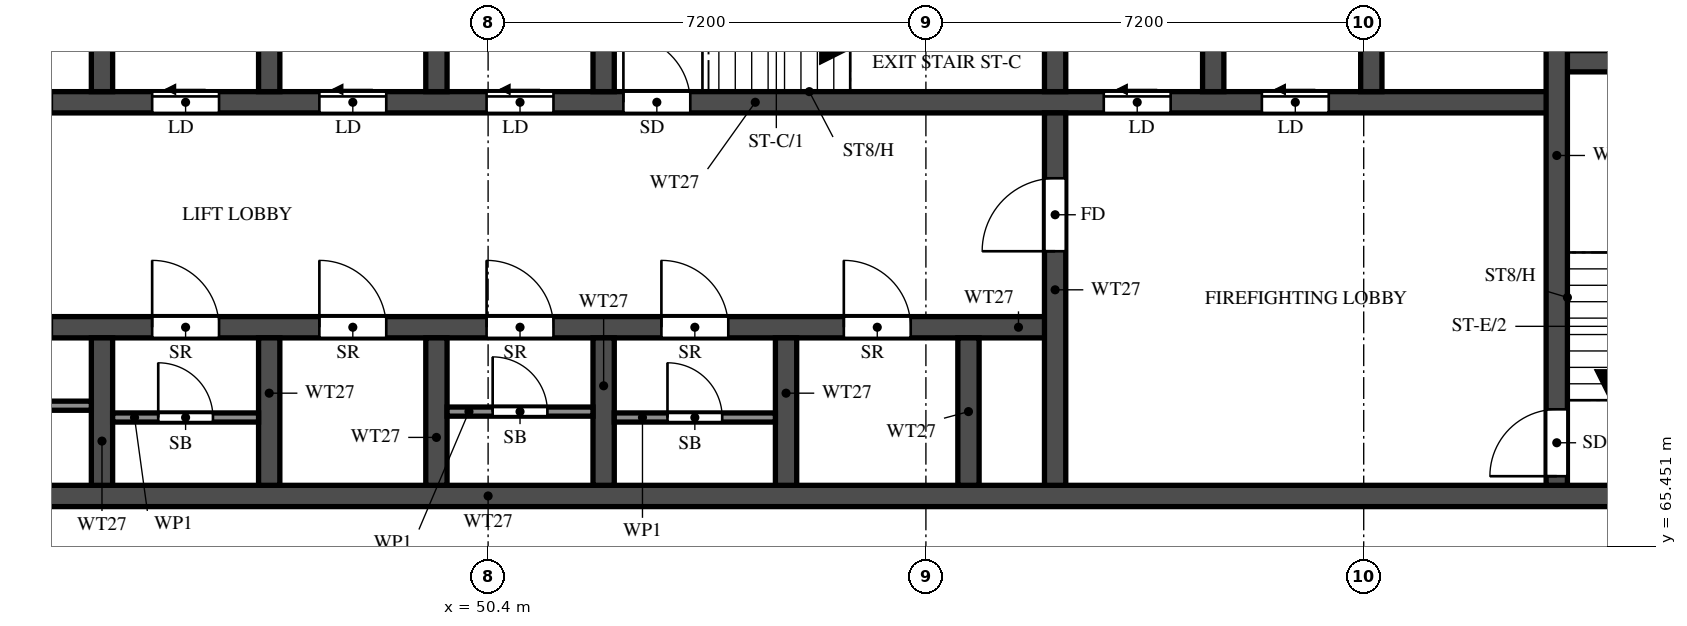
"""IFC4 building model, lengths in metres.
Left out: names, types, materials, properties, quantities, classifications, styles, units other than length and angle.
Written with IfcOpenShell. Run it as: python <this file> out.ifc"""

import sys

from ifc_helpers import new_model, si_unit, direction, frame, frame_2d, origin, place, context, subcontext, project, spatial, rectangle, extrude, element, fill, save


model = new_model("IFC4")
c1 = context("Model", 3, precision=1e-05, world=origin(), true_north=direction((0.0, 1.0)))
c2 = subcontext(c1, "Body", "Model", "MODEL_VIEW")
j1 = project(units=[si_unit("LENGTHUNIT", "METRE"), si_unit("PLANEANGLEUNIT", "RADIAN")], contexts=[c1])
p1 = place(None, origin())
s1 = spatial("IfcSite", under=j1, at=p1, CompositionType="ELEMENT")
p2 = place(p1, origin())
s2 = spatial("IfcBuilding", under=s1, at=p2, CompositionType="ELEMENT")
p3 = place(p2, frame((0.0, 0.0, 171.0)))
s3 = spatial("IfcBuildingStorey", under=s2, at=p3, CompositionType="ELEMENT", Elevation=171.0)
p4 = place(p3, frame((29.7, 66.275, 0.0), z_axis=(0.0, 0.0, 1.0), x_axis=(1.0, 0.0, 0.0)))
e1 = element("IfcWall", 1, at=p4, inside=s3, PredefinedType="SHEAR", context=c2, shape_type="SweptSolid", body=[
    extrude(rectangle(XDim=41.4, YDim=0.35, at=frame_2d((20.7, 0.0))), origin(), (0.0, 0.0, 1.0), 3.2),
])
p5 = place(p4, frame((0.925, 0.0, 0.0)))
e2 = element("IfcOpeningElement", 2, at=p5, cuts=e1, PredefinedType="OPENING", context=c2, shape_type="SweptSolid", body=[
    extrude(rectangle(XDim=1.1, YDim=2.1, at=frame_2d((0.55, 1.05))), frame((0.0, 0.185, 0.0), z_axis=(0.0, -1.0, 0.0), x_axis=(1.0, 0.0, 0.0)), (0.0, 0.0, 1.0), 0.37),
])
p6 = place(p4, frame((3.712, 0.0, 0.0)))
e3 = element("IfcOpeningElement", 3, at=p6, cuts=e1, PredefinedType="OPENING", context=c2, shape_type="SweptSolid", body=[
    extrude(rectangle(XDim=1.8, YDim=2.1, at=frame_2d((0.9, 1.05))), frame((0.0, 0.185, 0.0), z_axis=(0.0, -1.0, 0.0), x_axis=(1.0, 0.0, 0.0)), (0.0, 0.0, 1.0), 0.37),
])
p7 = place(p3, frame((35.625, 69.05, 0.0), z_axis=(0.0, 0.0, 1.0), x_axis=(1.0, 0.0, 0.0)))
e4 = element("IfcWall", 4, at=p7, inside=s3, PredefinedType="SHEAR", context=c2, shape_type="SweptSolid", body=[
    extrude(rectangle(XDim=24.1, YDim=0.35, at=frame_2d((12.05, 0.0))), origin(), (0.0, 0.0, 1.0), 3.2),
])
p8 = place(p7, frame((1.0, 0.0, 0.0)))
e5 = element("IfcOpeningElement", 5, at=p8, cuts=e4, PredefinedType="OPENING", context=c2, shape_type="SweptSolid", body=[
    extrude(rectangle(XDim=1.1, YDim=2.1, at=frame_2d((0.55, 1.05))), frame((0.0, 0.185, 0.0), z_axis=(0.0, -1.0, 0.0), x_axis=(1.0, 0.0, 0.0)), (0.0, 0.0, 1.0), 0.37),
])
p9 = place(p7, frame((3.75, 0.0, 0.0)))
e6 = element("IfcOpeningElement", 6, at=p9, cuts=e4, PredefinedType="OPENING", context=c2, shape_type="SweptSolid", body=[
    extrude(rectangle(XDim=1.1, YDim=2.1, at=frame_2d((0.55, 1.05))), frame((0.0, 0.185, 0.0), z_axis=(0.0, -1.0, 0.0), x_axis=(1.0, 0.0, 0.0)), (0.0, 0.0, 1.0), 0.37),
])
p10 = place(p7, frame((6.5, 0.0, 0.0)))
e7 = element("IfcOpeningElement", 7, at=p10, cuts=e4, PredefinedType="OPENING", context=c2, shape_type="SweptSolid", body=[
    extrude(rectangle(XDim=1.1, YDim=2.1, at=frame_2d((0.55, 1.05))), frame((0.0, 0.185, 0.0), z_axis=(0.0, -1.0, 0.0), x_axis=(1.0, 0.0, 0.0)), (0.0, 0.0, 1.0), 0.37),
])
p11 = place(p7, frame((9.25, 0.0, 0.0)))
e8 = element("IfcOpeningElement", 8, at=p11, cuts=e4, PredefinedType="OPENING", context=c2, shape_type="SweptSolid", body=[
    extrude(rectangle(XDim=1.1, YDim=2.1, at=frame_2d((0.55, 1.05))), frame((0.0, 0.185, 0.0), z_axis=(0.0, -1.0, 0.0), x_axis=(1.0, 0.0, 0.0)), (0.0, 0.0, 1.0), 0.37),
])
p12 = place(p7, frame((12.0, 0.0, 0.0)))
e9 = element("IfcOpeningElement", 9, at=p12, cuts=e4, PredefinedType="OPENING", context=c2, shape_type="SweptSolid", body=[
    extrude(rectangle(XDim=1.1, YDim=2.1, at=frame_2d((0.55, 1.05))), frame((0.0, 0.185, 0.0), z_axis=(0.0, -1.0, 0.0), x_axis=(1.0, 0.0, 0.0)), (0.0, 0.0, 1.0), 0.37),
])
p13 = place(p7, frame((14.75, 0.0, 0.0)))
e10 = element("IfcOpeningElement", 10, at=p13, cuts=e4, PredefinedType="OPENING", context=c2, shape_type="SweptSolid", body=[
    extrude(rectangle(XDim=1.1, YDim=2.1, at=frame_2d((0.55, 1.05))), frame((0.0, 0.185, 0.0), z_axis=(0.0, -1.0, 0.0), x_axis=(1.0, 0.0, 0.0)), (0.0, 0.0, 1.0), 0.37),
])
p14 = place(p7, frame((17.625, 0.0, 0.0)))
e11 = element("IfcOpeningElement", 11, at=p14, cuts=e4, PredefinedType="OPENING", context=c2, shape_type="SweptSolid", body=[
    extrude(rectangle(XDim=1.1, YDim=2.1, at=frame_2d((0.55, 1.05))), frame((0.0, 0.185, 0.0), z_axis=(0.0, -1.0, 0.0), x_axis=(1.0, 0.0, 0.0)), (0.0, 0.0, 1.0), 0.37),
])
p15 = place(p7, frame((20.625, 0.0, 0.0)))
e12 = element("IfcOpeningElement", 12, at=p15, cuts=e4, PredefinedType="OPENING", context=c2, shape_type="SweptSolid", body=[
    extrude(rectangle(XDim=1.1, YDim=2.1, at=frame_2d((0.55, 1.05))), frame((0.0, 0.185, 0.0), z_axis=(0.0, -1.0, 0.0), x_axis=(1.0, 0.0, 0.0)), (0.0, 0.0, 1.0), 0.37),
])
p16 = place(p3, frame((32.825, 72.75, 0.0), z_axis=(0.0, 0.0, 1.0), x_axis=(1.0, 0.0, 0.0)))
e13 = element("IfcWall", 13, at=p16, inside=s3, PredefinedType="SHEAR", context=c2, shape_type="SweptSolid", body=[
    extrude(rectangle(XDim=35.15, YDim=0.35, at=frame_2d((17.575, 0.0))), origin(), (0.0, 0.0, 1.0), 3.2),
])
p17 = place(p16, frame((19.8, 0.0, 0.0)))
e14 = element("IfcOpeningElement", 14, at=p17, cuts=e13, PredefinedType="OPENING", context=c2, shape_type="SweptSolid", body=[
    extrude(rectangle(XDim=1.1, YDim=2.1, at=frame_2d((0.55, 1.05))), frame((0.0, 0.185, 0.0), z_axis=(0.0, -1.0, 0.0), x_axis=(1.0, 0.0, 0.0)), (0.0, 0.0, 1.0), 0.37),
])
p18 = place(p16, frame((27.7, 0.0, 0.0)))
e15 = element("IfcOpeningElement", 15, at=p18, cuts=e13, PredefinedType="OPENING", context=c2, shape_type="SweptSolid", body=[
    extrude(rectangle(XDim=1.1, YDim=2.1, at=frame_2d((0.55, 1.05))), frame((0.0, 0.185, 0.0), z_axis=(0.0, -1.0, 0.0), x_axis=(1.0, 0.0, 0.0)), (0.0, 0.0, 1.0), 0.37),
])
p19 = place(p16, frame((30.3, 0.0, 0.0)))
e16 = element("IfcOpeningElement", 16, at=p19, cuts=e13, PredefinedType="OPENING", context=c2, shape_type="SweptSolid", body=[
    extrude(rectangle(XDim=1.1, YDim=2.1, at=frame_2d((0.55, 1.05))), frame((0.0, 0.185, 0.0), z_axis=(0.0, -1.0, 0.0), x_axis=(1.0, 0.0, 0.0)), (0.0, 0.0, 1.0), 0.37),
])
p20 = place(p16, frame((3.8, 0.0, 0.0)))
e17 = element("IfcOpeningElement", 17, at=p20, cuts=e13, PredefinedType="OPENING", context=c2, shape_type="SweptSolid", body=[
    extrude(rectangle(XDim=1.1, YDim=2.1, at=frame_2d((0.55, 1.05))), frame((0.0, 0.185, 0.0), z_axis=(0.0, -1.0, 0.0), x_axis=(1.0, 0.0, 0.0)), (0.0, 0.0, 1.0), 0.37),
])
p21 = place(p16, frame((6.55, 0.0, 0.0)))
e18 = element("IfcOpeningElement", 18, at=p21, cuts=e13, PredefinedType="OPENING", context=c2, shape_type="SweptSolid", body=[
    extrude(rectangle(XDim=1.1, YDim=2.1, at=frame_2d((0.55, 1.05))), frame((0.0, 0.185, 0.0), z_axis=(0.0, -1.0, 0.0), x_axis=(1.0, 0.0, 0.0)), (0.0, 0.0, 1.0), 0.37),
])
p22 = place(p16, frame((9.3, 0.0, 0.0)))
e19 = element("IfcOpeningElement", 19, at=p22, cuts=e13, PredefinedType="OPENING", context=c2, shape_type="SweptSolid", body=[
    extrude(rectangle(XDim=1.1, YDim=2.1, at=frame_2d((0.55, 1.05))), frame((0.0, 0.185, 0.0), z_axis=(0.0, -1.0, 0.0), x_axis=(1.0, 0.0, 0.0)), (0.0, 0.0, 1.0), 0.37),
])
p23 = place(p16, frame((12.05, 0.0, 0.0)))
e20 = element("IfcOpeningElement", 20, at=p23, cuts=e13, PredefinedType="OPENING", context=c2, shape_type="SweptSolid", body=[
    extrude(rectangle(XDim=1.1, YDim=2.1, at=frame_2d((0.55, 1.05))), frame((0.0, 0.185, 0.0), z_axis=(0.0, -1.0, 0.0), x_axis=(1.0, 0.0, 0.0)), (0.0, 0.0, 1.0), 0.37),
])
p24 = place(p16, frame((14.8, 0.0, 0.0)))
e21 = element("IfcOpeningElement", 21, at=p24, cuts=e13, PredefinedType="OPENING", context=c2, shape_type="SweptSolid", body=[
    extrude(rectangle(XDim=1.1, YDim=2.1, at=frame_2d((0.55, 1.05))), frame((0.0, 0.185, 0.0), z_axis=(0.0, -1.0, 0.0), x_axis=(1.0, 0.0, 0.0)), (0.0, 0.0, 1.0), 0.37),
])
p25 = place(p16, frame((17.55, 0.0, 0.0)))
e22 = element("IfcOpeningElement", 22, at=p25, cuts=e13, PredefinedType="OPENING", context=c2, shape_type="SweptSolid", body=[
    extrude(rectangle(XDim=1.1, YDim=2.1, at=frame_2d((0.55, 1.05))), frame((0.0, 0.185, 0.0), z_axis=(0.0, -1.0, 0.0), x_axis=(1.0, 0.0, 0.0)), (0.0, 0.0, 1.0), 0.37),
])
p26 = place(p16, frame((0.938, 0.0, 0.0)))
e23 = element("IfcOpeningElement", 23, at=p26, cuts=e13, PredefinedType="OPENING", context=c2, shape_type="SweptSolid", body=[
    extrude(rectangle(XDim=1.1, YDim=2.1, at=frame_2d((0.55, 1.05))), frame((0.0, 0.185, 0.0), z_axis=(0.0, -1.0, 0.0), x_axis=(1.0, 0.0, 0.0)), (0.0, 0.0, 1.0), 0.37),
])
p27 = place(p3, frame((67.975, 73.425, 0.0), z_axis=(0.0, 0.0, 1.0), x_axis=(1.0, 0.0, 0.0)))
e24 = element("IfcWall", 24, at=p27, inside=s3, PredefinedType="SHEAR", context=c2, shape_type="SweptSolid", body=[
    extrude(rectangle(XDim=3.125, YDim=0.35, at=frame_2d((1.562, 0.0))), origin(), (0.0, 0.0, 1.0), 3.2),
])
p28 = place(p3, frame((67.975, 66.45, 0.0), z_axis=(0.0, 0.0, 1.0), x_axis=(0.0, 1.0, 0.0)))
e25 = element("IfcWall", 25, at=p28, inside=s3, PredefinedType="SHEAR", context=c2, shape_type="SweptSolid", body=[
    extrude(rectangle(XDim=10.85, YDim=0.35, at=frame_2d((5.425, 0.0))), origin(), (0.0, 0.0, 1.0), 3.2),
])
p29 = place(p28, frame((0.15, 0.0, 0.0)))
e26 = element("IfcOpeningElement", 26, at=p29, cuts=e25, PredefinedType="OPENING", context=c2, shape_type="SweptSolid", body=[
    extrude(rectangle(XDim=1.1, YDim=2.1, at=frame_2d((0.55, 1.05))), frame((0.0, 0.185, 0.0), z_axis=(0.0, -1.0, 0.0), x_axis=(1.0, 0.0, 0.0)), (0.0, 0.0, 1.0), 0.37),
])
p30 = place(p3, frame((59.725, 66.45, 0.0), z_axis=(0.0, 0.0, 1.0), x_axis=(0.0, 1.0, 0.0)))
e27 = element("IfcWall", 27, at=p30, inside=s3, PredefinedType="SHEAR", context=c2, shape_type="SweptSolid", body=[
    extrude(rectangle(XDim=6.125, YDim=0.35, at=frame_2d((3.062, 0.0))), origin(), (0.0, 0.0, 1.0), 3.2),
])
p31 = place(p30, frame((3.85, 0.0, 0.0)))
e28 = element("IfcOpeningElement", 28, at=p31, cuts=e27, PredefinedType="OPENING", context=c2, shape_type="SweptSolid", body=[
    extrude(rectangle(XDim=1.2, YDim=2.1, at=frame_2d((0.6, 1.05))), frame((0.0, 0.185, 0.0), z_axis=(0.0, -1.0, 0.0), x_axis=(1.0, 0.0, 0.0)), (0.0, 0.0, 1.0), 0.37),
])
p32 = place(p3, frame((59.725, 72.925, 0.0), z_axis=(0.0, 0.0, 1.0), x_axis=(0.0, 1.0, 0.0)))
e29 = element("IfcWall", 29, at=p32, inside=s3, PredefinedType="SHEAR", context=c2, shape_type="SweptSolid", body=[
    extrude(rectangle(XDim=2.95, YDim=0.35, at=frame_2d((1.475, 0.0))), origin(), (0.0, 0.0, 1.0), 3.2),
])
for number, where, z_axis, x_axis in (
    (30, (44.05, 66.45, 0.0), (0.0, 0.0, 1.0), (0.0, 1.0, 0.0)),
    (31, (46.8, 66.45, 0.0), (0.0, 0.0, 1.0), (0.0, 1.0, 0.0)),
    (32, (49.55, 66.45, 0.0), (0.0, 0.0, 1.0), (0.0, 1.0, 0.0)),
    (33, (52.3, 66.45, 0.0), (0.0, 0.0, 1.0), (0.0, 1.0, 0.0)),
    (34, (55.3, 66.45, 0.0), (0.0, 0.0, 1.0), (0.0, 1.0, 0.0)),
    (35, (58.3, 66.45, 0.0), (0.0, 0.0, 1.0), (0.0, 1.0, 0.0)),
):
    element("IfcWall", number, at=place(p3, frame(where, z_axis=z_axis, x_axis=x_axis)), inside=s3, PredefinedType="SHEAR", context=c2, shape_type="SweptSolid", body=[
        extrude(rectangle(XDim=2.425, YDim=0.35, at=frame_2d((1.212, 0.0))), origin(), (0.0, 0.0, 1.0), 3.2),
    ])
for number, where, z_axis, x_axis in (
    (36, (44.05, 72.925, 0.0), (0.0, 0.0, 1.0), (0.0, 1.0, 0.0)),
    (37, (46.8, 72.925, 0.0), (0.0, 0.0, 1.0), (0.0, 1.0, 0.0)),
    (38, (49.55, 72.925, 0.0), (0.0, 0.0, 1.0), (0.0, 1.0, 0.0)),
    (39, (52.3, 72.925, 0.0), (0.0, 0.0, 1.0), (0.0, 1.0, 0.0)),
    (40, (62.325, 72.925, 0.0), (0.0, 0.0, 1.0), (0.0, 1.0, 0.0)),
    (41, (64.925, 72.925, 0.0), (0.0, 0.0, 1.0), (0.0, 1.0, 0.0)),
):
    element("IfcWall", number, at=place(p3, frame(where, z_axis=z_axis, x_axis=x_axis)), inside=s3, PredefinedType="SHEAR", context=c2, shape_type="SweptSolid", body=[
        extrude(rectangle(XDim=2.95, YDim=0.35, at=frame_2d((1.475, 0.0))), origin(), (0.0, 0.0, 1.0), 3.2),
    ])
p33 = place(p3, frame((41.475, 67.76, 0.0), z_axis=(0.0, 0.0, 1.0), x_axis=(1.0, 0.0, 0.0)))
e42 = element("IfcWall", 42, at=p33, inside=s3, PredefinedType="PARTITIONING", context=c2, shape_type="SweptSolid", body=[
    extrude(rectangle(XDim=2.4, YDim=0.15, at=frame_2d((1.2, 0.0))), origin(), (0.0, 0.0, 1.0), 3.2),
])
p34 = place(p33, frame((0.75, 0.0, 0.0)))
e43 = element("IfcOpeningElement", 43, at=p34, cuts=e42, PredefinedType="OPENING", context=c2, shape_type="SweptSolid", body=[
    extrude(rectangle(XDim=0.9, YDim=2.1, at=frame_2d((0.45, 1.05))), frame((0.0, 0.085, 0.0), z_axis=(0.0, -1.0, 0.0), x_axis=(1.0, 0.0, 0.0)), (0.0, 0.0, 1.0), 0.17),
])
p35 = place(p3, frame((44.225, 67.565, 0.0), z_axis=(0.0, 0.0, 1.0), x_axis=(1.0, 0.0, 0.0)))
e44 = element("IfcWall", 44, at=p35, inside=s3, PredefinedType="PARTITIONING", context=c2, shape_type="SweptSolid", body=[
    extrude(rectangle(XDim=2.4, YDim=0.15, at=frame_2d((1.2, 0.0))), origin(), (0.0, 0.0, 1.0), 3.2),
])
p36 = place(p35, frame((0.75, 0.0, 0.0)))
e45 = element("IfcOpeningElement", 45, at=p36, cuts=e44, PredefinedType="OPENING", context=c2, shape_type="SweptSolid", body=[
    extrude(rectangle(XDim=0.9, YDim=2.1, at=frame_2d((0.45, 1.05))), frame((0.0, 0.085, 0.0), z_axis=(0.0, -1.0, 0.0), x_axis=(1.0, 0.0, 0.0)), (0.0, 0.0, 1.0), 0.17),
])
p37 = place(p3, frame((49.725, 67.663, 0.0), z_axis=(0.0, 0.0, 1.0), x_axis=(1.0, 0.0, 0.0)))
e46 = element("IfcWall", 46, at=p37, inside=s3, PredefinedType="PARTITIONING", context=c2, shape_type="SweptSolid", body=[
    extrude(rectangle(XDim=2.4, YDim=0.15, at=frame_2d((1.2, 0.0))), origin(), (0.0, 0.0, 1.0), 3.2),
])
p38 = place(p37, frame((0.75, 0.0, 0.0)))
e47 = element("IfcOpeningElement", 47, at=p38, cuts=e46, PredefinedType="OPENING", context=c2, shape_type="SweptSolid", body=[
    extrude(rectangle(XDim=0.9, YDim=2.1, at=frame_2d((0.45, 1.05))), frame((0.0, 0.085, 0.0), z_axis=(0.0, -1.0, 0.0), x_axis=(1.0, 0.0, 0.0)), (0.0, 0.0, 1.0), 0.17),
])
p39 = place(p3, frame((52.475, 67.565, 0.0), z_axis=(0.0, 0.0, 1.0), x_axis=(1.0, 0.0, 0.0)))
e48 = element("IfcWall", 48, at=p39, inside=s3, PredefinedType="PARTITIONING", context=c2, shape_type="SweptSolid", body=[
    extrude(rectangle(XDim=2.65, YDim=0.15, at=frame_2d((1.325, 0.0))), origin(), (0.0, 0.0, 1.0), 3.2),
])
p40 = place(p39, frame((0.875, 0.0, 0.0)))
e49 = element("IfcOpeningElement", 49, at=p40, cuts=e48, PredefinedType="OPENING", context=c2, shape_type="SweptSolid", body=[
    extrude(rectangle(XDim=0.9, YDim=2.1, at=frame_2d((0.45, 1.05))), frame((0.0, 0.085, 0.0), z_axis=(0.0, -1.0, 0.0), x_axis=(1.0, 0.0, 0.0)), (0.0, 0.0, 1.0), 0.17),
])
p41 = place(p17, origin())
e50 = element("IfcDoor", 50, at=p41, inside=s3, OperationType="SINGLE_SWING_LEFT", PredefinedType="DOOR", context=c2, shape_type="SweptSolid", body=[
    extrude(rectangle(XDim=1.1, YDim=2.1, at=frame_2d((0.55, 1.05))), frame((0.0, 0.025, 0.0), z_axis=(0.0, -1.0, 0.0), x_axis=(1.0, 0.0, 0.0)), (0.0, 0.0, 1.0), 0.05),
])
fill(e14, e50)
p42 = place(p29, origin())
e51 = element("IfcDoor", 51, at=p42, inside=s3, OperationType="SINGLE_SWING_LEFT", PredefinedType="DOOR", context=c2, shape_type="SweptSolid", body=[
    extrude(rectangle(XDim=1.1, YDim=2.1, at=frame_2d((0.55, 1.05))), frame((0.0, 0.025, 0.0), z_axis=(0.0, -1.0, 0.0), x_axis=(1.0, 0.0, 0.0)), (0.0, 0.0, 1.0), 0.05),
])
fill(e26, e51)
p43 = place(p31, origin())
e52 = element("IfcDoor", 52, at=p43, inside=s3, OperationType="SINGLE_SWING_LEFT", PredefinedType="DOOR", context=c2, shape_type="SweptSolid", body=[
    extrude(rectangle(XDim=1.2, YDim=2.1, at=frame_2d((0.6, 1.05))), frame((0.0, 0.025, 0.0), z_axis=(0.0, -1.0, 0.0), x_axis=(1.0, 0.0, 0.0)), (0.0, 0.0, 1.0), 0.05),
])
fill(e28, e52)
p44 = place(p18, origin())
e53 = element("IfcDoor", 53, at=p44, inside=s3, OperationType="SLIDING_TO_LEFT", PredefinedType="DOOR", context=c2, shape_type="SweptSolid", body=[
    extrude(rectangle(XDim=1.1, YDim=2.1, at=frame_2d((0.55, 1.05))), frame((0.0, 0.025, 0.0), z_axis=(0.0, -1.0, 0.0), x_axis=(1.0, 0.0, 0.0)), (0.0, 0.0, 1.0), 0.05),
])
fill(e15, e53)
p45 = place(p19, origin())
e54 = element("IfcDoor", 54, at=p45, inside=s3, OperationType="SLIDING_TO_LEFT", PredefinedType="DOOR", context=c2, shape_type="SweptSolid", body=[
    extrude(rectangle(XDim=1.1, YDim=2.1, at=frame_2d((0.55, 1.05))), frame((0.0, 0.025, 0.0), z_axis=(0.0, -1.0, 0.0), x_axis=(1.0, 0.0, 0.0)), (0.0, 0.0, 1.0), 0.05),
])
fill(e16, e54)
p46 = place(p11, origin())
e55 = element("IfcDoor", 55, at=p46, inside=s3, OperationType="SINGLE_SWING_LEFT", PredefinedType="DOOR", context=c2, shape_type="SweptSolid", body=[
    extrude(rectangle(XDim=1.1, YDim=2.1, at=frame_2d((0.55, 1.05))), frame((0.0, 0.025, 0.0), z_axis=(0.0, -1.0, 0.0), x_axis=(1.0, 0.0, 0.0)), (0.0, 0.0, 1.0), 0.05),
])
fill(e8, e55)
p47 = place(p36, origin())
e56 = element("IfcDoor", 56, at=p47, inside=s3, OperationType="SINGLE_SWING_LEFT", PredefinedType="DOOR", context=c2, shape_type="SweptSolid", body=[
    extrude(rectangle(XDim=0.9, YDim=2.1, at=frame_2d((0.45, 1.05))), frame((0.0, 0.025, 0.0), z_axis=(0.0, -1.0, 0.0), x_axis=(1.0, 0.0, 0.0)), (0.0, 0.0, 1.0), 0.05),
])
fill(e45, e56)
p48 = place(p12, origin())
e57 = element("IfcDoor", 57, at=p48, inside=s3, OperationType="SINGLE_SWING_RIGHT", PredefinedType="DOOR", context=c2, shape_type="SweptSolid", body=[
    extrude(rectangle(XDim=1.1, YDim=2.1, at=frame_2d((0.55, 1.05))), frame((0.0, 0.025, 0.0), z_axis=(0.0, -1.0, 0.0), x_axis=(1.0, 0.0, 0.0)), (0.0, 0.0, 1.0), 0.05),
])
fill(e9, e57)
p49 = place(p13, origin())
e58 = element("IfcDoor", 58, at=p49, inside=s3, OperationType="SINGLE_SWING_LEFT", PredefinedType="DOOR", context=c2, shape_type="SweptSolid", body=[
    extrude(rectangle(XDim=1.1, YDim=2.1, at=frame_2d((0.55, 1.05))), frame((0.0, 0.025, 0.0), z_axis=(0.0, -1.0, 0.0), x_axis=(1.0, 0.0, 0.0)), (0.0, 0.0, 1.0), 0.05),
])
fill(e10, e58)
p50 = place(p38, origin())
e59 = element("IfcDoor", 59, at=p50, inside=s3, OperationType="SINGLE_SWING_LEFT", PredefinedType="DOOR", context=c2, shape_type="SweptSolid", body=[
    extrude(rectangle(XDim=0.9, YDim=2.1, at=frame_2d((0.45, 1.05))), frame((0.0, 0.025, 0.0), z_axis=(0.0, -1.0, 0.0), x_axis=(1.0, 0.0, 0.0)), (0.0, 0.0, 1.0), 0.05),
])
fill(e47, e59)
p51 = place(p14, origin())
e60 = element("IfcDoor", 60, at=p51, inside=s3, OperationType="SINGLE_SWING_RIGHT", PredefinedType="DOOR", context=c2, shape_type="SweptSolid", body=[
    extrude(rectangle(XDim=1.1, YDim=2.1, at=frame_2d((0.55, 1.05))), frame((0.0, 0.025, 0.0), z_axis=(0.0, -1.0, 0.0), x_axis=(1.0, 0.0, 0.0)), (0.0, 0.0, 1.0), 0.05),
])
fill(e11, e60)
p52 = place(p40, origin())
e61 = element("IfcDoor", 61, at=p52, inside=s3, OperationType="SINGLE_SWING_RIGHT", PredefinedType="DOOR", context=c2, shape_type="SweptSolid", body=[
    extrude(rectangle(XDim=0.9, YDim=2.1, at=frame_2d((0.45, 1.05))), frame((0.0, 0.025, 0.0), z_axis=(0.0, -1.0, 0.0), x_axis=(1.0, 0.0, 0.0)), (0.0, 0.0, 1.0), 0.05),
])
fill(e49, e61)
p53 = place(p15, origin())
e62 = element("IfcDoor", 62, at=p53, inside=s3, OperationType="SINGLE_SWING_RIGHT", PredefinedType="DOOR", context=c2, shape_type="SweptSolid", body=[
    extrude(rectangle(XDim=1.1, YDim=2.1, at=frame_2d((0.55, 1.05))), frame((0.0, 0.025, 0.0), z_axis=(0.0, -1.0, 0.0), x_axis=(1.0, 0.0, 0.0)), (0.0, 0.0, 1.0), 0.05),
])
fill(e12, e62)
p54 = place(p23, origin())
e63 = element("IfcDoor", 63, at=p54, inside=s3, OperationType="SLIDING_TO_LEFT", PredefinedType="DOOR", context=c2, shape_type="SweptSolid", body=[
    extrude(rectangle(XDim=1.1, YDim=2.1, at=frame_2d((0.55, 1.05))), frame((0.0, 0.025, 0.0), z_axis=(0.0, -1.0, 0.0), x_axis=(1.0, 0.0, 0.0)), (0.0, 0.0, 1.0), 0.05),
])
fill(e20, e63)
p55 = place(p24, origin())
e64 = element("IfcDoor", 64, at=p55, inside=s3, OperationType="SLIDING_TO_LEFT", PredefinedType="DOOR", context=c2, shape_type="SweptSolid", body=[
    extrude(rectangle(XDim=1.1, YDim=2.1, at=frame_2d((0.55, 1.05))), frame((0.0, 0.025, 0.0), z_axis=(0.0, -1.0, 0.0), x_axis=(1.0, 0.0, 0.0)), (0.0, 0.0, 1.0), 0.05),
])
fill(e21, e64)
p56 = place(p25, origin())
e65 = element("IfcDoor", 65, at=p56, inside=s3, OperationType="SLIDING_TO_LEFT", PredefinedType="DOOR", context=c2, shape_type="SweptSolid", body=[
    extrude(rectangle(XDim=1.1, YDim=2.1, at=frame_2d((0.55, 1.05))), frame((0.0, 0.025, 0.0), z_axis=(0.0, -1.0, 0.0), x_axis=(1.0, 0.0, 0.0)), (0.0, 0.0, 1.0), 0.05),
])
fill(e22, e65)
save(model, sys.argv[1])
